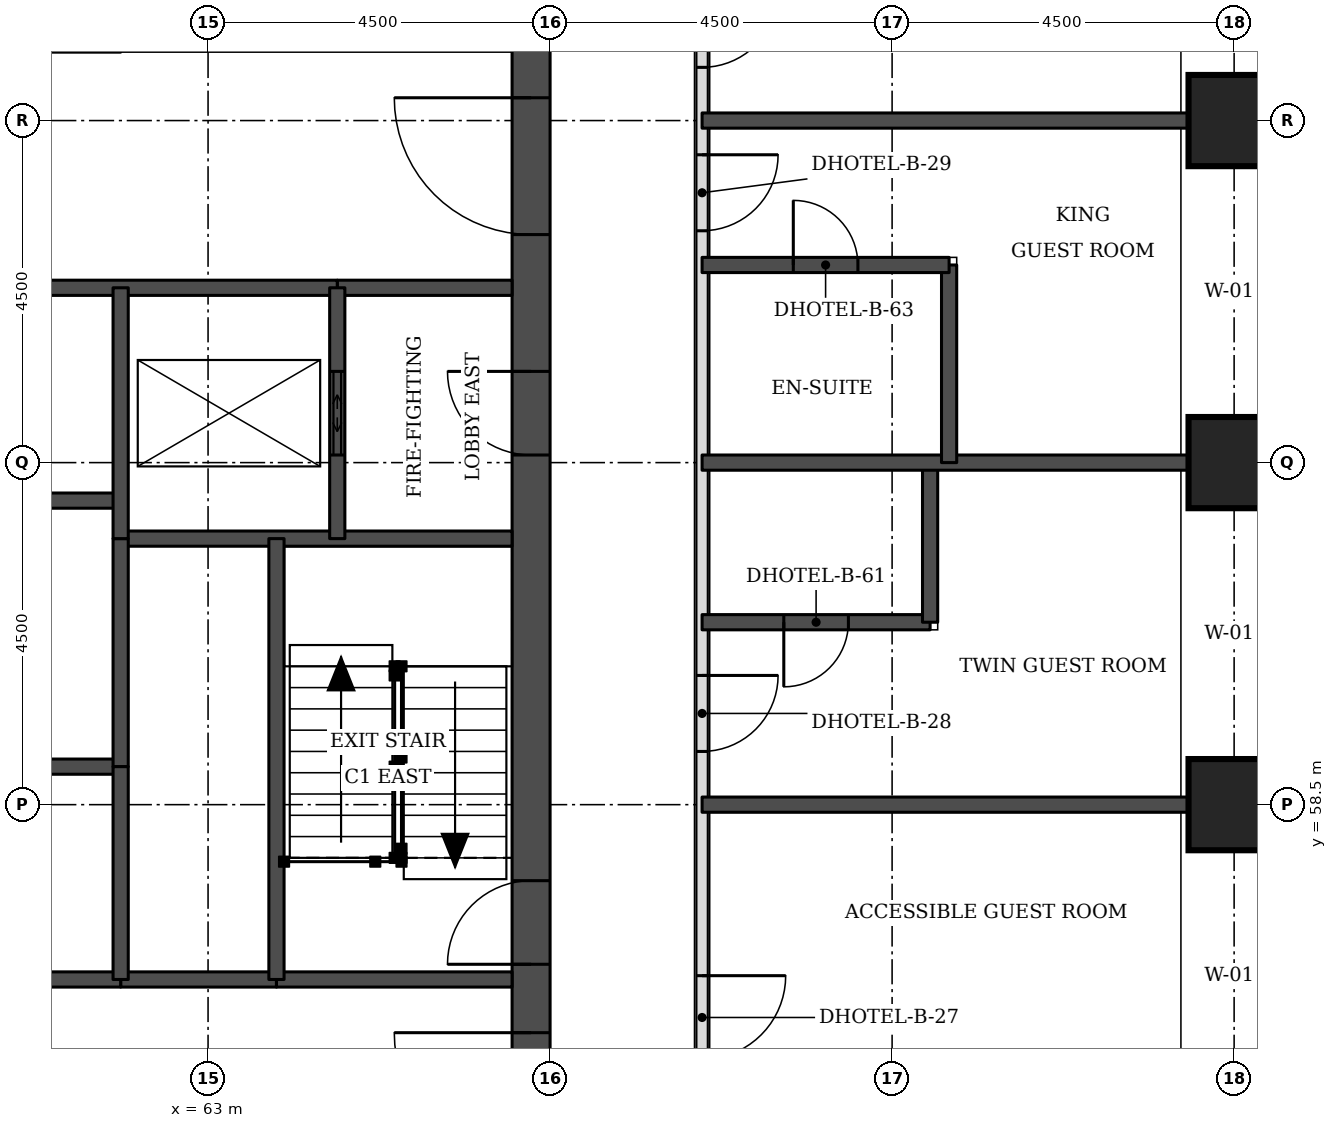
"""IFC4 building model, lengths in metres.
Left out: names, types, materials, properties, quantities, classifications, styles, units other than length and angle.
Written with IfcOpenShell. Run it as: python <this file> out.ifc"""

import sys

from ifc_helpers import new_model, si_unit, direction, frame, frame_2d, origin, origin_2d, place, context, subcontext, project, spatial, rectangle, extrude, element, fill, save


model = new_model("IFC4")
c1 = context("Model", 3, precision=1e-05, world=origin(), true_north=direction((0.0, 1.0)))
c2 = subcontext(c1, "Body", "Model", "MODEL_VIEW")
j1 = project(units=[si_unit("LENGTHUNIT", "METRE"), si_unit("PLANEANGLEUNIT", "RADIAN")], contexts=[c1])
p1 = place(None, origin())
s1 = spatial("IfcSite", under=j1, at=p1, CompositionType="ELEMENT")
p2 = place(p1, origin())
s2 = spatial("IfcBuilding", under=s1, at=p2, CompositionType="ELEMENT")
p3 = place(p2, frame((0.0, 0.0, 29.7)))
s3 = spatial("IfcBuildingStorey", under=s2, at=p3, CompositionType="ELEMENT", Elevation=29.7)
for number, where, z_axis, x_axis in (
    (1, (76.5, 58.5, 0.0), (0.0, 0.0, 1.0), (1.0, 0.0, 0.0)),
    (2, (76.5, 63.0, 0.0), (0.0, 0.0, 1.0), (1.0, 0.0, 0.0)),
    (3, (76.5, 67.5, 0.0), (0.0, 0.0, 1.0), (1.0, 0.0, 0.0)),
):
    element("IfcColumn", number, at=place(p3, frame(where, z_axis=z_axis, x_axis=x_axis)), inside=s3, PredefinedType="COLUMN", context=c2, shape_type="SweptSolid", body=[
        extrude(rectangle(XDim=1.2, YDim=1.2, at=origin_2d()), origin(), (0.0, 0.0, 1.0), 3.3),
    ])
p4 = place(p3, frame((67.25, 49.5, 0.0), z_axis=(0.0, 0.0, 1.0), x_axis=(0.0, 1.0, 0.0)))
e4 = element("IfcWall", 4, at=p4, inside=s3, PredefinedType="SHEAR", context=c2, shape_type="SweptSolid", body=[
    extrude(rectangle(XDim=22.5, YDim=0.5, at=frame_2d((11.25, 0.0))), origin(), (0.0, 0.0, 1.0), 3.3),
])
p5 = place(p4, frame((4.2, 0.0, 0.0)))
e5 = element("IfcOpeningElement", 5, at=p5, cuts=e4, PredefinedType="OPENING", context=c2, shape_type="SweptSolid", body=[
    extrude(rectangle(XDim=1.8, YDim=2.1, at=frame_2d((0.9, 1.05))), frame((0.0, 0.26, 0.0), z_axis=(0.0, -1.0, 0.0), x_axis=(1.0, 0.0, 0.0)), (0.0, 0.0, 1.0), 0.52),
])
p6 = place(p4, frame((6.9, 0.0, 0.0)))
e6 = element("IfcOpeningElement", 6, at=p6, cuts=e4, PredefinedType="OPENING", context=c2, shape_type="SweptSolid", body=[
    extrude(rectangle(XDim=1.1, YDim=2.1, at=frame_2d((0.55, 1.05))), frame((0.0, 0.26, 0.0), z_axis=(0.0, -1.0, 0.0), x_axis=(1.0, 0.0, 0.0)), (0.0, 0.0, 1.0), 0.52),
])
p7 = place(p4, frame((13.6, 0.0, 0.0)))
e7 = element("IfcOpeningElement", 7, at=p7, cuts=e4, PredefinedType="OPENING", context=c2, shape_type="SweptSolid", body=[
    extrude(rectangle(XDim=1.1, YDim=2.1, at=frame_2d((0.55, 1.05))), frame((0.0, 0.26, 0.0), z_axis=(0.0, -1.0, 0.0), x_axis=(1.0, 0.0, 0.0)), (0.0, 0.0, 1.0), 0.52),
])
p8 = place(p4, frame((16.5, 0.0, 0.0)))
e8 = element("IfcOpeningElement", 8, at=p8, cuts=e4, PredefinedType="OPENING", context=c2, shape_type="SweptSolid", body=[
    extrude(rectangle(XDim=1.8, YDim=2.1, at=frame_2d((0.9, 1.05))), frame((0.0, 0.26, 0.0), z_axis=(0.0, -1.0, 0.0), x_axis=(1.0, 0.0, 0.0)), (0.0, 0.0, 1.0), 0.52),
])
p9 = place(p3, frame((69.5, 47.5, 0.0), z_axis=(0.0, 0.0, 1.0), x_axis=(0.0, 1.0, 0.0)))
e9 = element("IfcWall", 9, at=p9, inside=s3, PredefinedType="PARTITIONING", context=c2, shape_type="SweptSolid", body=[
    extrude(rectangle(XDim=26.5, YDim=0.15, at=frame_2d((13.25, 0.0))), origin(), (0.0, 0.0, 1.0), 3.08),
])
p10 = place(p9, frame((24.95, 0.0, 0.0)))
e10 = element("IfcOpeningElement", 10, at=p10, cuts=e9, PredefinedType="OPENING", context=c2, shape_type="SweptSolid", body=[
    extrude(rectangle(XDim=1.0, YDim=2.1, at=frame_2d((0.5, 1.05))), frame((0.0, 0.085, 0.0), z_axis=(0.0, -1.0, 0.0), x_axis=(1.0, 0.0, 0.0)), (0.0, 0.0, 1.0), 0.17),
])
p11 = place(p9, frame((20.7, 0.0, 0.0)))
e11 = element("IfcOpeningElement", 11, at=p11, cuts=e9, PredefinedType="OPENING", context=c2, shape_type="SweptSolid", body=[
    extrude(rectangle(XDim=1.0, YDim=2.1, at=frame_2d((0.5, 1.05))), frame((0.0, 0.085, 0.0), z_axis=(0.0, -1.0, 0.0), x_axis=(1.0, 0.0, 0.0)), (0.0, 0.0, 1.0), 0.17),
])
p12 = place(p9, frame((18.55, 0.0, 0.0)))
e12 = element("IfcOpeningElement", 12, at=p12, cuts=e9, PredefinedType="OPENING", context=c2, shape_type="SweptSolid", body=[
    extrude(rectangle(XDim=1.0, YDim=2.1, at=frame_2d((0.5, 1.05))), frame((0.0, 0.085, 0.0), z_axis=(0.0, -1.0, 0.0), x_axis=(1.0, 0.0, 0.0)), (0.0, 0.0, 1.0), 0.17),
])
p13 = place(p9, frame((11.7, 0.0, 0.0)))
e13 = element("IfcOpeningElement", 13, at=p13, cuts=e9, PredefinedType="OPENING", context=c2, shape_type="SweptSolid", body=[
    extrude(rectangle(XDim=1.0, YDim=2.1, at=frame_2d((0.5, 1.05))), frame((0.0, 0.085, 0.0), z_axis=(0.0, -1.0, 0.0), x_axis=(1.0, 0.0, 0.0)), (0.0, 0.0, 1.0), 0.17),
])
p14 = place(p9, frame((7.65, 0.0, 0.0)))
e14 = element("IfcOpeningElement", 14, at=p14, cuts=e9, PredefinedType="OPENING", context=c2, shape_type="SweptSolid", body=[
    extrude(rectangle(XDim=1.1, YDim=2.1, at=frame_2d((0.55, 1.05))), frame((0.0, 0.085, 0.0), z_axis=(0.0, -1.0, 0.0), x_axis=(1.0, 0.0, 0.0)), (0.0, 0.0, 1.0), 0.17),
])
p15 = place(p9, frame((0.447, 0.0, 0.0)))
e15 = element("IfcOpeningElement", 15, at=p15, cuts=e9, PredefinedType="OPENING", context=c2, shape_type="SweptSolid", body=[
    extrude(rectangle(XDim=1.0, YDim=2.1, at=frame_2d((0.5, 1.05))), frame((0.0, 0.085, 0.0), z_axis=(0.0, -1.0, 0.0), x_axis=(1.0, 0.0, 0.0)), (0.0, 0.0, 1.0), 0.17),
])
p16 = place(p3, frame((69.5, 58.5, 0.0), z_axis=(0.0, 0.0, 1.0), x_axis=(1.0, 0.0, 0.0)))
e16 = element("IfcWall", 16, at=p16, inside=s3, PredefinedType="SOLIDWALL", context=c2, shape_type="SweptSolid", body=[
    extrude(rectangle(XDim=6.4, YDim=0.2, at=frame_2d((3.2, 0.0))), origin(), (0.0, 0.0, 1.0), 3.08),
])
p17 = place(p3, frame((69.5, 60.9, 0.0), z_axis=(0.0, 0.0, 1.0), x_axis=(1.0, 0.0, 0.0)))
e17 = element("IfcWall", 17, at=p17, inside=s3, PredefinedType="SOLIDWALL", context=c2, shape_type="SweptSolid", body=[
    extrude(rectangle(XDim=3.0, YDim=0.2, at=frame_2d((1.5, 0.0))), origin(), (0.0, 0.0, 1.0), 3.08),
])
p18 = place(p17, frame((1.075, 0.0, 0.0)))
e18 = element("IfcOpeningElement", 18, at=p18, cuts=e17, PredefinedType="OPENING", context=c2, shape_type="SweptSolid", body=[
    extrude(rectangle(XDim=0.85, YDim=2.1, at=frame_2d((0.425, 1.05))), frame((0.0, 0.11, 0.0), z_axis=(0.0, -1.0, 0.0), x_axis=(1.0, 0.0, 0.0)), (0.0, 0.0, 1.0), 0.22),
])
p19 = place(p3, frame((72.5, 60.9, 0.0), z_axis=(0.0, 0.0, 1.0), x_axis=(0.0, 1.0, 0.0)))
e19 = element("IfcWall", 19, at=p19, inside=s3, PredefinedType="SOLIDWALL", context=c2, shape_type="SweptSolid", body=[
    extrude(rectangle(XDim=2.1, YDim=0.2, at=frame_2d((1.05, 0.0))), origin(), (0.0, 0.0, 1.0), 3.08),
])
p20 = place(p3, frame((69.5, 63.0, 0.0), z_axis=(0.0, 0.0, 1.0), x_axis=(1.0, 0.0, 0.0)))
e20 = element("IfcWall", 20, at=p20, inside=s3, PredefinedType="SOLIDWALL", context=c2, shape_type="SweptSolid", body=[
    extrude(rectangle(XDim=6.4, YDim=0.2, at=frame_2d((3.2, 0.0))), origin(), (0.0, 0.0, 1.0), 3.08),
])
p21 = place(p3, frame((72.75, 63.0, 0.0), z_axis=(0.0, 0.0, 1.0), x_axis=(0.0, 1.0, 0.0)))
e21 = element("IfcWall", 21, at=p21, inside=s3, PredefinedType="SOLIDWALL", context=c2, shape_type="SweptSolid", body=[
    extrude(rectangle(XDim=2.6, YDim=0.2, at=frame_2d((1.3, 0.0))), origin(), (0.0, 0.0, 1.0), 3.08),
])
p22 = place(p3, frame((69.5, 65.6, 0.0), z_axis=(0.0, 0.0, 1.0), x_axis=(1.0, 0.0, 0.0)))
e22 = element("IfcWall", 22, at=p22, inside=s3, PredefinedType="SOLIDWALL", context=c2, shape_type="SweptSolid", body=[
    extrude(rectangle(XDim=3.25, YDim=0.2, at=frame_2d((1.625, 0.0))), origin(), (0.0, 0.0, 1.0), 3.08),
])
p23 = place(p22, frame((1.2, 0.0, 0.0)))
e23 = element("IfcOpeningElement", 23, at=p23, cuts=e22, PredefinedType="OPENING", context=c2, shape_type="SweptSolid", body=[
    extrude(rectangle(XDim=0.85, YDim=2.1, at=frame_2d((0.425, 1.05))), frame((0.0, 0.11, 0.0), z_axis=(0.0, -1.0, 0.0), x_axis=(1.0, 0.0, 0.0)), (0.0, 0.0, 1.0), 0.22),
])
p24 = place(p3, frame((69.5, 67.5, 0.0), z_axis=(0.0, 0.0, 1.0), x_axis=(1.0, 0.0, 0.0)))
e24 = element("IfcWall", 24, at=p24, inside=s3, PredefinedType="SOLIDWALL", context=c2, shape_type="SweptSolid", body=[
    extrude(rectangle(XDim=6.4, YDim=0.2, at=frame_2d((3.2, 0.0))), origin(), (0.0, 0.0, 1.0), 3.08),
])
p25 = place(p3, frame((61.85, 56.2, 0.0), z_axis=(0.0, 0.0, 1.0), x_axis=(1.0, 0.0, 0.0)))
e25 = element("IfcWall", 25, at=p25, inside=s3, PredefinedType="SOLIDWALL", context=c2, shape_type="SweptSolid", body=[
    extrude(rectangle(XDim=2.05, YDim=0.2, at=frame_2d((1.025, 0.0))), origin(), (0.0, 0.0, 1.0), 3.08),
])
p26 = place(p3, frame((50.65, 56.2, 0.0), z_axis=(0.0, 0.0, 1.0), x_axis=(1.0, 0.0, 0.0)))
e26 = element("IfcWall", 26, at=p26, inside=s3, PredefinedType="SOLIDWALL", context=c2, shape_type="SweptSolid", body=[
    extrude(rectangle(XDim=11.2, YDim=0.2, at=frame_2d((5.6, 0.0))), origin(), (0.0, 0.0, 1.0), 3.08),
])
p27 = place(p3, frame((63.9, 56.2, 0.0), z_axis=(0.0, 0.0, 1.0), x_axis=(1.0, 0.0, 0.0)))
e27 = element("IfcWall", 27, at=p27, inside=s3, PredefinedType="SOLIDWALL", context=c2, shape_type="SweptSolid", body=[
    extrude(rectangle(XDim=3.1, YDim=0.2, at=frame_2d((1.55, 0.0))), origin(), (0.0, 0.0, 1.0), 3.08),
])
p28 = place(p3, frame((50.65, 59.0, 0.0), z_axis=(0.0, 0.0, 1.0), x_axis=(1.0, 0.0, 0.0)))
e28 = element("IfcWall", 28, at=p28, inside=s3, PredefinedType="SOLIDWALL", context=c2, shape_type="SweptSolid", body=[
    extrude(rectangle(XDim=11.2, YDim=0.2, at=frame_2d((5.6, 0.0))), origin(), (0.0, 0.0, 1.0), 3.3),
])
p29 = place(p3, frame((61.85, 62.0, 0.0), z_axis=(0.0, 0.0, 1.0), x_axis=(1.0, 0.0, 0.0)))
e29 = element("IfcWall", 29, at=p29, inside=s3, PredefinedType="SOLIDWALL", context=c2, shape_type="SweptSolid", body=[
    extrude(rectangle(XDim=5.15, YDim=0.2, at=frame_2d((2.575, 0.0))), origin(), (0.0, 0.0, 1.0), 3.08),
])
p30 = place(p3, frame((50.65, 62.5, 0.0), z_axis=(0.0, 0.0, 1.0), x_axis=(1.0, 0.0, 0.0)))
e30 = element("IfcWall", 30, at=p30, inside=s3, PredefinedType="SOLIDWALL", context=c2, shape_type="SweptSolid", body=[
    extrude(rectangle(XDim=11.2, YDim=0.2, at=frame_2d((5.6, 0.0))), origin(), (0.0, 0.0, 1.0), 3.3),
])
p31 = place(p3, frame((64.7, 65.3, 0.0), z_axis=(0.0, 0.0, 1.0), x_axis=(1.0, 0.0, 0.0)))
e31 = element("IfcWall", 31, at=p31, inside=s3, PredefinedType="SOLIDWALL", context=c2, shape_type="SweptSolid", body=[
    extrude(rectangle(XDim=2.3, YDim=0.2, at=frame_2d((1.15, 0.0))), origin(), (0.0, 0.0, 1.0), 3.08),
])
p32 = place(p3, frame((47.8, 65.3, 0.0), z_axis=(0.0, 0.0, 1.0), x_axis=(1.0, 0.0, 0.0)))
e32 = element("IfcWall", 32, at=p32, inside=s3, PredefinedType="SOLIDWALL", context=c2, shape_type="SweptSolid", body=[
    extrude(rectangle(XDim=16.9, YDim=0.2, at=frame_2d((8.45, 0.0))), origin(), (0.0, 0.0, 1.0), 3.08),
])
p33 = place(p3, frame((61.85, 59.0, 0.0), z_axis=(0.0, 0.0, 1.0), x_axis=(0.0, 1.0, 0.0)))
e33 = element("IfcWall", 33, at=p33, inside=s3, PredefinedType="SOLIDWALL", context=c2, shape_type="SweptSolid", body=[
    extrude(rectangle(XDim=3.0, YDim=0.2, at=frame_2d((1.5, 0.0))), origin(), (0.0, 0.0, 1.0), 3.3),
])
p34 = place(p3, frame((61.85, 56.2, 0.0), z_axis=(0.0, 0.0, 1.0), x_axis=(0.0, 1.0, 0.0)))
e34 = element("IfcWall", 34, at=p34, inside=s3, PredefinedType="SOLIDWALL", context=c2, shape_type="SweptSolid", body=[
    extrude(rectangle(XDim=2.8, YDim=0.2, at=frame_2d((1.4, 0.0))), origin(), (0.0, 0.0, 1.0), 3.08),
])
p35 = place(p3, frame((61.85, 62.0, 0.0), z_axis=(0.0, 0.0, 1.0), x_axis=(0.0, 1.0, 0.0)))
e35 = element("IfcWall", 35, at=p35, inside=s3, PredefinedType="SOLIDWALL", context=c2, shape_type="SweptSolid", body=[
    extrude(rectangle(XDim=3.3, YDim=0.2, at=frame_2d((1.65, 0.0))), origin(), (0.0, 0.0, 1.0), 3.08),
])
p36 = place(p3, frame((63.9, 56.2, 0.0), z_axis=(0.0, 0.0, 1.0), x_axis=(0.0, 1.0, 0.0)))
e36 = element("IfcWall", 36, at=p36, inside=s3, PredefinedType="SOLIDWALL", context=c2, shape_type="SweptSolid", body=[
    extrude(rectangle(XDim=5.8, YDim=0.2, at=frame_2d((2.9, 0.0))), origin(), (0.0, 0.0, 1.0), 3.08),
])
p37 = place(p3, frame((64.7, 62.0, 0.0), z_axis=(0.0, 0.0, 1.0), x_axis=(0.0, 1.0, 0.0)))
e37 = element("IfcWall", 37, at=p37, inside=s3, PredefinedType="SOLIDWALL", context=c2, shape_type="SweptSolid", body=[
    extrude(rectangle(XDim=3.3, YDim=0.2, at=frame_2d((1.65, 0.0))), origin(), (0.0, 0.0, 1.0), 3.08),
])
p38 = place(p37, frame((1.1, 0.0, 0.0)))
e38 = element("IfcOpeningElement", 38, at=p38, cuts=e37, PredefinedType="OPENING", context=c2, shape_type="SweptSolid", body=[
    extrude(rectangle(XDim=1.1, YDim=2.1, at=frame_2d((0.55, 1.05))), frame((0.0, 0.11, 0.0), z_axis=(0.0, -1.0, 0.0), x_axis=(1.0, 0.0, 0.0)), (0.0, 0.0, 1.0), 0.22),
])
p39 = place(p11, frame((1.0, 0.0, 0.0), z_axis=(0.0, 0.0, 1.0), x_axis=(-1.0, 0.0, 0.0)))
e39 = element("IfcDoor", 39, at=p39, inside=s3, OperationType="SINGLE_SWING_LEFT", PredefinedType="DOOR", context=c2, shape_type="SweptSolid", body=[
    extrude(rectangle(XDim=1.0, YDim=2.1, at=frame_2d((0.5, 1.05))), frame((0.0, 0.025, 0.0), z_axis=(0.0, -1.0, 0.0), x_axis=(1.0, 0.0, 0.0)), (0.0, 0.0, 1.0), 0.05),
])
fill(e11, e39)
p40 = place(p12, frame((1.0, 0.0, 0.0), z_axis=(0.0, 0.0, 1.0), x_axis=(-1.0, 0.0, 0.0)))
e40 = element("IfcDoor", 40, at=p40, inside=s3, OperationType="SINGLE_SWING_LEFT", PredefinedType="DOOR", context=c2, shape_type="SweptSolid", body=[
    extrude(rectangle(XDim=1.0, YDim=2.1, at=frame_2d((0.5, 1.05))), frame((0.0, 0.025, 0.0), z_axis=(0.0, -1.0, 0.0), x_axis=(1.0, 0.0, 0.0)), (0.0, 0.0, 1.0), 0.05),
])
fill(e12, e40)
p41 = place(p23, origin())
e41 = element("IfcDoor", 41, at=p41, inside=s3, OperationType="SINGLE_SWING_LEFT", PredefinedType="DOOR", context=c2, shape_type="SweptSolid", body=[
    extrude(rectangle(XDim=0.85, YDim=2.1, at=frame_2d((0.425, 1.05))), frame((0.0, 0.025, 0.0), z_axis=(0.0, -1.0, 0.0), x_axis=(1.0, 0.0, 0.0)), (0.0, 0.0, 1.0), 0.05),
])
fill(e23, e41)
p42 = place(p13, frame((1.0, 0.0, 0.0), z_axis=(0.0, 0.0, 1.0), x_axis=(-1.0, 0.0, 0.0)))
e42 = element("IfcDoor", 42, at=p42, inside=s3, OperationType="SINGLE_SWING_LEFT", PredefinedType="DOOR", context=c2, shape_type="SweptSolid", body=[
    extrude(rectangle(XDim=1.0, YDim=2.1, at=frame_2d((0.5, 1.05))), frame((0.0, 0.025, 0.0), z_axis=(0.0, -1.0, 0.0), x_axis=(1.0, 0.0, 0.0)), (0.0, 0.0, 1.0), 0.05),
])
fill(e13, e42)
p43 = place(p18, frame((0.85, 0.0, 0.0), z_axis=(0.0, 0.0, 1.0), x_axis=(-1.0, 0.0, 0.0)))
e43 = element("IfcDoor", 43, at=p43, inside=s3, OperationType="SINGLE_SWING_RIGHT", PredefinedType="DOOR", context=c2, shape_type="SweptSolid", body=[
    extrude(rectangle(XDim=0.85, YDim=2.1, at=frame_2d((0.425, 1.05))), frame((0.0, 0.025, 0.0), z_axis=(0.0, -1.0, 0.0), x_axis=(1.0, 0.0, 0.0)), (0.0, 0.0, 1.0), 0.05),
])
fill(e18, e43)
p44 = place(p14, frame((1.1, 0.0, 0.0), z_axis=(0.0, 0.0, 1.0), x_axis=(-1.0, 0.0, 0.0)))
e44 = element("IfcDoor", 44, at=p44, inside=s3, OperationType="SINGLE_SWING_LEFT", PredefinedType="DOOR", context=c2, shape_type="SweptSolid", body=[
    extrude(rectangle(XDim=1.1, YDim=2.1, at=frame_2d((0.55, 1.05))), frame((0.0, 0.025, 0.0), z_axis=(0.0, -1.0, 0.0), x_axis=(1.0, 0.0, 0.0)), (0.0, 0.0, 1.0), 0.05),
])
fill(e14, e44)
p45 = place(p38, origin())
e45 = element("IfcDoor", 45, at=p45, inside=s3, OperationType="DOUBLE_DOOR_SLIDING", PredefinedType="DOOR", context=c2, shape_type="SweptSolid", body=[
    extrude(rectangle(XDim=1.1, YDim=2.1, at=frame_2d((0.55, 1.05))), frame((0.0, 0.025, 0.0), z_axis=(0.0, -1.0, 0.0), x_axis=(1.0, 0.0, 0.0)), (0.0, 0.0, 1.0), 0.05),
])
fill(e38, e45)
p46 = place(p5, origin())
e46 = element("IfcDoor", 46, at=p46, inside=s3, OperationType="SINGLE_SWING_RIGHT", PredefinedType="DOOR", context=c2, shape_type="SweptSolid", body=[
    extrude(rectangle(XDim=1.8, YDim=2.1, at=frame_2d((0.9, 1.05))), frame((0.0, 0.025, 0.0), z_axis=(0.0, -1.0, 0.0), x_axis=(1.0, 0.0, 0.0)), (0.0, 0.0, 1.0), 0.05),
])
fill(e5, e46)
p47 = place(p6, origin())
e47 = element("IfcDoor", 47, at=p47, inside=s3, OperationType="SINGLE_SWING_LEFT", PredefinedType="DOOR", context=c2, shape_type="SweptSolid", body=[
    extrude(rectangle(XDim=1.1, YDim=2.1, at=frame_2d((0.55, 1.05))), frame((0.0, 0.025, 0.0), z_axis=(0.0, -1.0, 0.0), x_axis=(1.0, 0.0, 0.0)), (0.0, 0.0, 1.0), 0.05),
])
fill(e6, e47)
p48 = place(p7, origin())
e48 = element("IfcDoor", 48, at=p48, inside=s3, OperationType="SINGLE_SWING_RIGHT", PredefinedType="DOOR", context=c2, shape_type="SweptSolid", body=[
    extrude(rectangle(XDim=1.1, YDim=2.1, at=frame_2d((0.55, 1.05))), frame((0.0, 0.025, 0.0), z_axis=(0.0, -1.0, 0.0), x_axis=(1.0, 0.0, 0.0)), (0.0, 0.0, 1.0), 0.05),
])
fill(e7, e48)
p49 = place(p8, origin())
e49 = element("IfcDoor", 49, at=p49, inside=s3, OperationType="SINGLE_SWING_RIGHT", PredefinedType="DOOR", context=c2, shape_type="SweptSolid", body=[
    extrude(rectangle(XDim=1.8, YDim=2.1, at=frame_2d((0.9, 1.05))), frame((0.0, 0.025, 0.0), z_axis=(0.0, -1.0, 0.0), x_axis=(1.0, 0.0, 0.0)), (0.0, 0.0, 1.0), 0.05),
])
fill(e8, e49)
save(model, sys.argv[1])
